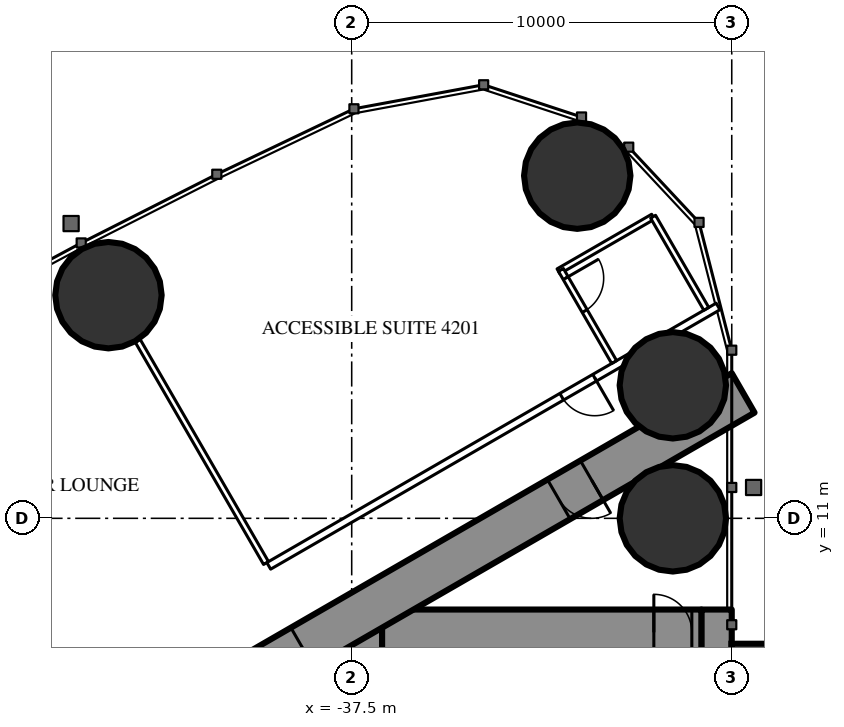
"""IFC4 building model, lengths in metres.
Left out: names, types, materials, properties, quantities, classifications, styles, units other than length and angle.
Written with IfcOpenShell. Run it as: python <this file> out.ifc"""

import sys

from ifc_helpers import new_model, si_unit, direction, frame, frame_2d, origin, origin_2d, place, context, subcontext, project, spatial, rectangle, circle, extrude, element, fill, save


model = new_model("IFC4")
c1 = context("Model", 3, precision=1e-05, world=origin(), true_north=direction((0.0, 1.0)))
c2 = subcontext(c1, "Body", "Model", "MODEL_VIEW")
j1 = project(units=[si_unit("LENGTHUNIT", "METRE"), si_unit("PLANEANGLEUNIT", "RADIAN")], contexts=[c1])
p1 = place(None, origin())
s1 = spatial("IfcSite", under=j1, at=p1, CompositionType="ELEMENT")
p2 = place(p1, origin())
s2 = spatial("IfcBuilding", under=s1, at=p2, CompositionType="ELEMENT")
p3 = place(p2, frame((0.0, 0.0, 159.8)))
s3 = spatial("IfcBuildingStorey", under=s2, at=p3, CompositionType="ELEMENT", Elevation=159.8)
for number, where, z_axis, x_axis in (
    (1, (-31.565, 20.016, 0.0), (0.0, 0.0, 1.0), (1.0, 0.0, 0.0)),
    (2, (-29.05, 11.0, 0.0), (0.0, 0.0, 1.0), (1.0, 0.0, 0.0)),
    (3, (-29.05, 14.5, 0.0), (0.0, 0.0, 1.0), (1.0, 0.0, 0.0)),
    (4, (-43.9, 16.871, 0.0), (0.0, 0.0, 1.0), (1.0, 0.0, 0.0)),
):
    element("IfcColumn", number, at=place(p3, frame(where, z_axis=z_axis, x_axis=x_axis)), inside=s3, PredefinedType="COLUMN", context=c2, shape_type="SweptSolid", body=[
        extrude(circle(Radius=1.4, at=origin_2d()), origin(), (0.0, 0.0, 1.0), 3.5),
    ])
p4 = place(p3, frame((-27.9, 8.6, 0.0), z_axis=(0.0, 0.0, 1.0), x_axis=(0.0, -1.0, 0.0)))
e5 = element("IfcWall", 5, at=p4, inside=s3, PredefinedType="SHEAR", context=c2, shape_type="SweptSolid", body=[
    extrude(rectangle(XDim=17.2, YDim=0.8, at=frame_2d((8.6, 0.0))), origin(), (0.0, 0.0, 1.0), 3.5),
])
p5 = place(p4, frame((2.45, 0.0, 0.6)))
e6 = element("IfcOpeningElement", 6, at=p5, cuts=e5, PredefinedType="OPENING", context=c2, shape_type="SweptSolid", body=[
    extrude(rectangle(XDim=0.6, YDim=2.1, at=frame_2d((0.3, 1.05))), frame((0.0, 0.41, 0.0), z_axis=(0.0, -1.0, 0.0), x_axis=(1.0, 0.0, 0.0)), (0.0, 0.0, 1.0), 0.82),
])
p6 = place(p4, frame((14.15, 0.0, 0.6)))
e7 = element("IfcOpeningElement", 7, at=p6, cuts=e5, PredefinedType="OPENING", context=c2, shape_type="SweptSolid", body=[
    extrude(rectangle(XDim=0.6, YDim=2.1, at=frame_2d((0.3, 1.05))), frame((0.0, 0.41, 0.0), z_axis=(0.0, -1.0, 0.0), x_axis=(1.0, 0.0, 0.0)), (0.0, 0.0, 1.0), 0.82),
])
p7 = place(p3, frame((-37.3, 8.6, 0.0), z_axis=(0.0, 0.0, 1.0), x_axis=(0.0, -1.0, 0.0)))
e8 = element("IfcWall", 8, at=p7, inside=s3, PredefinedType="SHEAR", context=c2, shape_type="SweptSolid", body=[
    extrude(rectangle(XDim=17.2, YDim=1.2, at=frame_2d((8.6, 0.0))), origin(), (0.0, 0.0, 1.0), 3.5),
])
p8 = place(p7, frame((7.7, 0.0, 0.0)))
e9 = element("IfcOpeningElement", 9, at=p8, cuts=e8, PredefinedType="OPENING", context=c2, shape_type="SweptSolid", body=[
    extrude(rectangle(XDim=1.8, YDim=2.2, at=frame_2d((0.9, 1.1))), frame((0.0, 0.61, 0.0), z_axis=(0.0, -1.0, 0.0), x_axis=(1.0, 0.0, 0.0)), (0.0, 0.0, 1.0), 1.22),
])
p9 = place(p3, frame((-28.3, 8.0, 0.0), z_axis=(0.0, 0.0, 1.0), x_axis=(-1.0, 0.0, 0.0)))
e10 = element("IfcWall", 10, at=p9, inside=s3, PredefinedType="SHEAR", context=c2, shape_type="SweptSolid", body=[
    extrude(rectangle(XDim=8.4, YDim=1.2, at=frame_2d((4.2, 0.0))), origin(), (0.0, 0.0, 1.0), 3.5),
])
p10 = place(p9, frame((0.25, 0.0, 0.0)))
e11 = element("IfcOpeningElement", 11, at=p10, cuts=e10, PredefinedType="OPENING", context=c2, shape_type="SweptSolid", body=[
    extrude(rectangle(XDim=1.0, YDim=2.2, at=frame_2d((0.5, 1.1))), frame((0.0, 0.61, 0.0), z_axis=(0.0, -1.0, 0.0), x_axis=(1.0, 0.0, 0.0)), (0.0, 0.0, 1.0), 1.22),
])
p11 = place(p3, frame((-27.2, 14.3, 0.0), z_axis=(0.0, 0.0, 1.0), x_axis=(-0.866026593062, -0.499997940104, 0.0)))
e12 = element("IfcWall", 12, at=p11, inside=s3, PredefinedType="SHEAR", context=c2, shape_type="SweptSolid", body=[
    extrude(rectangle(XDim=28.946, YDim=1.2, at=frame_2d((14.473, 0.0))), origin(), (0.0, 0.0, 1.0), 3.5),
])
p12 = place(p11, frame((4.6, 0.0, 0.0)))
e13 = element("IfcOpeningElement", 13, at=p12, cuts=e12, PredefinedType="OPENING", context=c2, shape_type="SweptSolid", body=[
    extrude(rectangle(XDim=1.0, YDim=2.2, at=frame_2d((0.5, 1.1))), frame((0.0, 0.61, 0.0), z_axis=(0.0, -1.0, 0.0), x_axis=(1.0, 0.0, 0.0)), (0.0, 0.0, 1.0), 1.22),
])
p13 = place(p11, frame((13.395, 0.0, 0.0)))
e14 = element("IfcOpeningElement", 14, at=p13, cuts=e12, PredefinedType="OPENING", context=c2, shape_type="SweptSolid", body=[
    extrude(rectangle(XDim=1.8, YDim=2.2, at=frame_2d((0.9, 1.1))), frame((0.0, 0.61, 0.0), z_axis=(0.0, -1.0, 0.0), x_axis=(1.0, 0.0, 0.0)), (0.0, 0.0, 1.0), 1.22),
])
p14 = place(p3, frame((-39.754, 9.823, 0.0), z_axis=(0.0, 0.0, 1.0), x_axis=(-0.499997670926, 0.866026748472, 0.0)))
e15 = element("IfcWall", 15, at=p14, inside=s3, PredefinedType="PARTITIONING", context=c2, shape_type="SweptSolid", body=[
    extrude(rectangle(XDim=6.757, YDim=0.15, at=frame_2d((3.379, 0.0))), origin(), (0.0, 0.0, 1.0), 2.3),
])
p15 = place(p3, frame((-27.86, 16.575, 0.0), z_axis=(0.0, 0.0, 1.0), x_axis=(-0.866026850238, -0.499997494661, 0.0)))
e16 = element("IfcWall", 16, at=p15, inside=s3, PredefinedType="PARTITIONING", context=c2, shape_type="SweptSolid", body=[
    extrude(rectangle(XDim=13.651, YDim=0.2, at=frame_2d((6.826, 0.0))), origin(), (0.0, 0.0, 1.0), 3.25),
])
p16 = place(p15, frame((3.75, 0.0, 0.0)))
e17 = element("IfcOpeningElement", 17, at=p16, cuts=e16, PredefinedType="OPENING", context=c2, shape_type="SweptSolid", body=[
    extrude(rectangle(XDim=1.0, YDim=2.2, at=frame_2d((0.5, 1.1))), frame((0.0, 0.11, 0.0), z_axis=(0.0, -1.0, 0.0), x_axis=(1.0, 0.0, 0.0)), (0.0, 0.0, 1.0), 0.22),
])
p17 = place(p3, frame((-29.57, 18.936, 0.0), z_axis=(0.0, 0.0, 1.0), x_axis=(-0.866018712932, -0.500011588718, 0.0)))
e18 = element("IfcWall", 18, at=p17, inside=s3, PredefinedType="PARTITIONING", context=c2, shape_type="SweptSolid", body=[
    extrude(rectangle(XDim=2.875, YDim=0.15, at=frame_2d((1.438, 0.0))), origin(), (0.0, 0.0, 1.0), 3.25),
])
p18 = place(p3, frame((-30.595, 15.111, 0.0), z_axis=(0.0, 0.0, 1.0), x_axis=(-0.49998411664, 0.866034573852, 0.0)))
e19 = element("IfcWall", 19, at=p18, inside=s3, PredefinedType="PARTITIONING", context=c2, shape_type="SweptSolid", body=[
    extrude(rectangle(XDim=2.8, YDim=0.15, at=frame_2d((1.4, 0.0))), origin(), (0.0, 0.0, 1.0), 3.25),
])
p19 = place(p18, frame((1.55, 0.0, 0.0)))
e20 = element("IfcOpeningElement", 20, at=p19, cuts=e19, PredefinedType="OPENING", context=c2, shape_type="SweptSolid", body=[
    extrude(rectangle(XDim=1.0, YDim=2.2, at=frame_2d((0.5, 1.1))), frame((0.0, 0.085, 0.0), z_axis=(0.0, -1.0, 0.0), x_axis=(1.0, 0.0, 0.0)), (0.0, 0.0, 1.0), 0.17),
])
p20 = place(p3, frame((-28.17, 16.511, 0.0), z_axis=(0.0, 0.0, 1.0), x_axis=(-0.49994636267, 0.866056369097, 0.0)))
e21 = element("IfcWall", 21, at=p20, inside=s3, PredefinedType="PARTITIONING", context=c2, shape_type="SweptSolid", body=[
    extrude(rectangle(XDim=2.8, YDim=0.15, at=frame_2d((1.4, 0.0))), origin(), (0.0, 0.0, 1.0), 3.25),
])
p21 = place(p19, origin())
e22 = element("IfcDoor", 22, at=p21, inside=s3, OperationType="SINGLE_SWING_RIGHT", PredefinedType="DOOR", context=c2, shape_type="SweptSolid", body=[
    extrude(rectangle(XDim=1.0, YDim=2.2, at=frame_2d((0.5, 1.1))), frame((0.0, 0.025, 0.0), z_axis=(0.0, -1.0, 0.0), x_axis=(1.0, 0.0, 0.0)), (0.0, 0.0, 1.0), 0.05),
])
fill(e20, e22)
p22 = place(p16, origin())
e23 = element("IfcDoor", 23, at=p22, inside=s3, OperationType="SINGLE_SWING_LEFT", PredefinedType="DOOR", context=c2, shape_type="SweptSolid", body=[
    extrude(rectangle(XDim=1.0, YDim=2.2, at=frame_2d((0.5, 1.1))), frame((0.0, 0.025, 0.0), z_axis=(0.0, -1.0, 0.0), x_axis=(1.0, 0.0, 0.0)), (0.0, 0.0, 1.0), 0.05),
])
fill(e17, e23)
p23 = place(p12, origin())
e24 = element("IfcDoor", 24, at=p23, inside=s3, OperationType="SINGLE_SWING_LEFT", PredefinedType="DOOR", context=c2, shape_type="SweptSolid", body=[
    extrude(rectangle(XDim=1.0, YDim=2.2, at=frame_2d((0.5, 1.1))), frame((0.0, 0.025, 0.0), z_axis=(0.0, -1.0, 0.0), x_axis=(1.0, 0.0, 0.0)), (0.0, 0.0, 1.0), 0.05),
])
fill(e13, e24)
p24 = place(p13, origin())
e25 = element("IfcDoor", 25, at=p24, inside=s3, OperationType="DOUBLE_DOOR_SINGLE_SWING", PredefinedType="DOOR", context=c2, shape_type="SweptSolid", body=[
    extrude(rectangle(XDim=1.8, YDim=2.2, at=frame_2d((0.9, 1.1))), frame((0.0, 0.025, 0.0), z_axis=(0.0, -1.0, 0.0), x_axis=(1.0, 0.0, 0.0)), (0.0, 0.0, 1.0), 0.05),
])
fill(e14, e25)
p25 = place(p10, origin())
e26 = element("IfcDoor", 26, at=p25, inside=s3, OperationType="SINGLE_SWING_RIGHT", PredefinedType="DOOR", context=c2, shape_type="SweptSolid", body=[
    extrude(rectangle(XDim=1.0, YDim=2.2, at=frame_2d((0.5, 1.1))), frame((0.0, 0.025, 0.0), z_axis=(0.0, -1.0, 0.0), x_axis=(1.0, 0.0, 0.0)), (0.0, 0.0, 1.0), 0.05),
])
fill(e11, e26)
save(model, sys.argv[1])
